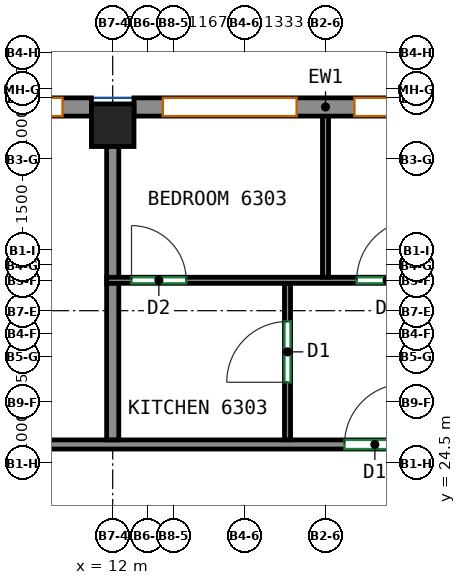
"""IFC4 building model, lengths in metres.
Left out: names, types, materials, properties, quantities, classifications, styles, units other than length and angle.
Written with IfcOpenShell. Run it as: python <this file> out.ifc"""

import sys

from ifc_helpers import new_model, si_unit, direction, frame, frame_2d, origin, origin_2d, place, context, subcontext, project, spatial, rectangle, extrude, source, transform, mapped, element, fill, save


model = new_model("IFC4")
c1 = context("Model", 3, precision=1e-05, world=origin(), true_north=direction((0.0, 1.0)))
c2 = subcontext(c1, "Body", "Model", "MODEL_VIEW")
j1 = project(units=[si_unit("LENGTHUNIT", "METRE"), si_unit("PLANEANGLEUNIT", "RADIAN")], contexts=[c1])
p1 = place(None, origin())
s1 = spatial("IfcSite", under=j1, at=p1, CompositionType="ELEMENT")
p2 = place(p1, origin())
s2 = spatial("IfcBuilding", under=s1, at=p2, CompositionType="ELEMENT")
p3 = place(p2, frame((0.0, 0.0, 259.4)))
s3 = spatial("IfcBuildingStorey", under=s2, at=p3, CompositionType="ELEMENT", Elevation=259.4)
m1 = source(origin(), c2, "Body", "SweptSolid", [
    extrude(rectangle(XDim=0.7, YDim=0.7, at=origin_2d()), origin(), (0.0, 0.0, 1.0), 3.0),
])
p4 = place(p3, frame((12.0, 30.05, 0.0), z_axis=(0.0, 0.0, 1.0), x_axis=(1.0, 0.0, 0.0)))
e1 = element("IfcColumn", 1, at=p4, inside=s3, PredefinedType="COLUMN", context=c2, shape_type="MappedRepresentation", body=[
    mapped(m1, transform((0.0, 0.0, 0.0))),
])
m2 = source(origin(), c2, "Body", "SweptSolid", [
    extrude(rectangle(XDim=6.3, YDim=0.3, at=frame_2d((3.15, 0.0))), origin(), (0.0, 0.0, 1.0), 3.0),
])
p5 = place(p3, frame((18.65, 30.35, 0.0), z_axis=(0.0, 0.0, 1.0), x_axis=(-1.0, 0.0, 0.0)))
e2 = element("IfcWall", 2, at=p5, inside=s3, PredefinedType="SOLIDWALL", context=c2, shape_type="MappedRepresentation", body=[
    mapped(m2, transform((0.0, 0.0, 0.0))),
])
p6 = place(p5, frame((0.475, 0.0, 0.8)))
e3 = element("IfcOpeningElement", 3, at=p6, cuts=e2, PredefinedType="OPENING", context=c2, shape_type="SweptSolid", body=[
    extrude(rectangle(XDim=2.2, YDim=2.05, at=frame_2d((1.1, 1.025))), frame((0.0, 0.16, 0.0), z_axis=(0.0, -1.0, 0.0), x_axis=(1.0, 0.0, 0.0)), (0.0, 0.0, 1.0), 0.32),
])
p7 = place(p5, frame((3.625, 0.0, 0.8)))
e4 = element("IfcOpeningElement", 4, at=p7, cuts=e2, PredefinedType="OPENING", context=c2, shape_type="SweptSolid", body=[
    extrude(rectangle(XDim=2.2, YDim=2.05, at=frame_2d((1.1, 1.025))), frame((0.0, 0.16, 0.0), z_axis=(0.0, -1.0, 0.0), x_axis=(1.0, 0.0, 0.0)), (0.0, 0.0, 1.0), 0.32),
])
p8 = place(p3, frame((11.65, 30.35, 0.0), z_axis=(0.0, 0.0, 1.0), x_axis=(-1.0, 0.0, 0.0)))
e5 = element("IfcWall", 5, at=p8, inside=s3, PredefinedType="SOLIDWALL", context=c2, shape_type="MappedRepresentation", body=[
    mapped(m2, transform((0.0, 0.0, 0.0))),
])
p9 = place(p8, frame((0.475, 0.0, 0.8)))
e6 = element("IfcOpeningElement", 6, at=p9, cuts=e5, PredefinedType="OPENING", context=c2, shape_type="SweptSolid", body=[
    extrude(rectangle(XDim=2.2, YDim=2.05, at=frame_2d((1.1, 1.025))), frame((0.0, 0.16, 0.0), z_axis=(0.0, -1.0, 0.0), x_axis=(1.0, 0.0, 0.0)), (0.0, 0.0, 1.0), 0.32),
])
p10 = place(p8, frame((3.625, 0.0, 0.8)))
e7 = element("IfcOpeningElement", 7, at=p10, cuts=e5, PredefinedType="OPENING", context=c2, shape_type="SweptSolid", body=[
    extrude(rectangle(XDim=2.2, YDim=2.05, at=frame_2d((1.1, 1.025))), frame((0.0, 0.16, 0.0), z_axis=(0.0, -1.0, 0.0), x_axis=(1.0, 0.0, 0.0)), (0.0, 0.0, 1.0), 0.32),
])
p11 = place(p3, frame((-16.075, 24.8, 0.0), z_axis=(0.0, 0.0, 1.0), x_axis=(1.0, 0.0, 0.0)))
e8 = element("IfcWall", 8, at=p11, inside=s3, PredefinedType="PARTITIONING", context=c2, shape_type="SweptSolid", body=[
    extrude(rectangle(XDim=36.073, YDim=0.15, at=frame_2d((18.037, 0.0))), origin(), (0.0, 0.0, 1.0), 3.0),
])
p12 = place(p11, frame((5.919, 0.0, 0.0)))
e9 = element("IfcOpeningElement", 9, at=p12, cuts=e8, PredefinedType="OPENING", context=c2, shape_type="SweptSolid", body=[
    extrude(rectangle(XDim=1.8, YDim=2.1, at=frame_2d((0.9, 1.05))), frame((0.0, 0.085, 0.0), z_axis=(0.0, -1.0, 0.0), x_axis=(1.0, 0.0, 0.0)), (0.0, 0.0, 1.0), 0.17),
])
p13 = place(p11, frame((31.887, 0.0, 0.0)))
e10 = element("IfcOpeningElement", 10, at=p13, cuts=e8, PredefinedType="OPENING", context=c2, shape_type="SweptSolid", body=[
    extrude(rectangle(XDim=1.0, YDim=2.1, at=frame_2d((0.5, 1.05))), frame((0.0, 0.085, 0.0), z_axis=(0.0, -1.0, 0.0), x_axis=(1.0, 0.0, 0.0)), (0.0, 0.0, 1.0), 0.17),
])
p14 = place(p3, frame((12.0, 24.877, 0.0), z_axis=(0.0, 0.0, 1.0), x_axis=(0.0, 1.0, 0.0)))
e11 = element("IfcWall", 11, at=p14, inside=s3, PredefinedType="PARTITIONING", context=c2, shape_type="SweptSolid", body=[
    extrude(rectangle(XDim=2.583, YDim=0.2, at=frame_2d((1.292, 0.0))), origin(), (0.0, 0.0, 1.0), 3.0),
])
p15 = place(p3, frame((12.0, 27.542, 0.0), z_axis=(0.0, 0.0, 1.0), x_axis=(0.0, 1.0, 0.0)))
e12 = element("IfcWall", 12, at=p15, inside=s3, PredefinedType="PARTITIONING", context=c2, shape_type="SweptSolid", body=[
    extrude(rectangle(XDim=2.158, YDim=0.2, at=frame_2d((1.079, 0.0))), origin(), (0.0, 0.0, 1.0), 3.0),
])
p16 = place(p3, frame((14.875, 24.877, 0.0), z_axis=(0.0, 0.0, 1.0), x_axis=(0.0, 1.0, 0.0)))
e13 = element("IfcWall", 13, at=p16, inside=s3, PredefinedType="PARTITIONING", context=c2, shape_type="SweptSolid", body=[
    extrude(rectangle(XDim=2.573, YDim=0.1, at=frame_2d((1.287, 0.0))), origin(), (0.0, 0.0, 1.0), 3.0),
])
p17 = place(p16, frame((0.946, 0.0, 0.0)))
e14 = element("IfcOpeningElement", 14, at=p17, cuts=e13, PredefinedType="OPENING", context=c2, shape_type="SweptSolid", body=[
    extrude(rectangle(XDim=1.0, YDim=2.1, at=frame_2d((0.5, 1.05))), frame((0.0, 0.06, 0.0), z_axis=(0.0, -1.0, 0.0), x_axis=(1.0, 0.0, 0.0)), (0.0, 0.0, 1.0), 0.12),
])
p18 = place(p3, frame((11.9, 27.5, 0.0), z_axis=(0.0, 0.0, 1.0), x_axis=(1.0, 0.0, 0.0)))
e15 = element("IfcWall", 15, at=p18, inside=s3, PredefinedType="PARTITIONING", context=c2, shape_type="SweptSolid", body=[
    extrude(rectangle(XDim=8.775, YDim=0.1, at=frame_2d((4.388, 0.0))), origin(), (0.0, 0.0, 1.0), 3.0),
])
p19 = place(p18, frame((0.409, 0.0, 0.0)))
e16 = element("IfcOpeningElement", 16, at=p19, cuts=e15, PredefinedType="OPENING", context=c2, shape_type="SweptSolid", body=[
    extrude(rectangle(XDim=0.9, YDim=2.1, at=frame_2d((0.45, 1.05))), frame((0.0, 0.06, 0.0), z_axis=(0.0, -1.0, 0.0), x_axis=(1.0, 0.0, 0.0)), (0.0, 0.0, 1.0), 0.12),
])
p20 = place(p18, frame((4.113, 0.0, 0.0)))
e17 = element("IfcOpeningElement", 17, at=p20, cuts=e15, PredefinedType="OPENING", context=c2, shape_type="SweptSolid", body=[
    extrude(rectangle(XDim=1.0, YDim=2.1, at=frame_2d((0.5, 1.05))), frame((0.0, 0.06, 0.0), z_axis=(0.0, -1.0, 0.0), x_axis=(1.0, 0.0, 0.0)), (0.0, 0.0, 1.0), 0.12),
])
p21 = place(p3, frame((15.5, 27.552, 0.0), z_axis=(0.0, 0.0, 1.0), x_axis=(0.0, 1.0, 0.0)))
e18 = element("IfcWall", 18, at=p21, inside=s3, PredefinedType="PARTITIONING", context=c2, shape_type="SweptSolid", body=[
    extrude(rectangle(XDim=2.698, YDim=0.1, at=frame_2d((1.349, 0.0))), origin(), (0.0, 0.0, 1.0), 3.0),
])
p22 = place(p6, origin())
e19 = element("IfcWindow", 19, at=p22, inside=s3, PartitioningType="SINGLE_PANEL", PredefinedType="WINDOW", context=c2, shape_type="SweptSolid", body=[
    extrude(rectangle(XDim=2.2, YDim=2.05, at=frame_2d((1.1, 1.025))), frame((0.0, 0.03, 0.0), z_axis=(0.0, -1.0, 0.0), x_axis=(1.0, 0.0, 0.0)), (0.0, 0.0, 1.0), 0.06),
])
fill(e3, e19)
p23 = place(p7, origin())
e20 = element("IfcWindow", 20, at=p23, inside=s3, PartitioningType="SINGLE_PANEL", PredefinedType="WINDOW", context=c2, shape_type="SweptSolid", body=[
    extrude(rectangle(XDim=2.2, YDim=2.05, at=frame_2d((1.1, 1.025))), frame((0.0, 0.03, 0.0), z_axis=(0.0, -1.0, 0.0), x_axis=(1.0, 0.0, 0.0)), (0.0, 0.0, 1.0), 0.06),
])
fill(e4, e20)
p24 = place(p9, origin())
e21 = element("IfcWindow", 21, at=p24, inside=s3, PartitioningType="SINGLE_PANEL", PredefinedType="WINDOW", context=c2, shape_type="SweptSolid", body=[
    extrude(rectangle(XDim=2.2, YDim=2.05, at=frame_2d((1.1, 1.025))), frame((0.0, 0.03, 0.0), z_axis=(0.0, -1.0, 0.0), x_axis=(1.0, 0.0, 0.0)), (0.0, 0.0, 1.0), 0.06),
])
fill(e6, e21)
p25 = place(p13, origin())
e22 = element("IfcDoor", 22, at=p25, inside=s3, OperationType="SINGLE_SWING_RIGHT", PredefinedType="DOOR", context=c2, shape_type="SweptSolid", body=[
    extrude(rectangle(XDim=1.0, YDim=2.1, at=frame_2d((0.5, 1.05))), frame((0.0, 0.025, 0.0), z_axis=(0.0, -1.0, 0.0), x_axis=(1.0, 0.0, 0.0)), (0.0, 0.0, 1.0), 0.05),
])
fill(e10, e22)
p26 = place(p17, origin())
e23 = element("IfcDoor", 23, at=p26, inside=s3, OperationType="SINGLE_SWING_LEFT", PredefinedType="DOOR", context=c2, shape_type="SweptSolid", body=[
    extrude(rectangle(XDim=1.0, YDim=2.1, at=frame_2d((0.5, 1.05))), frame((0.0, 0.025, 0.0), z_axis=(0.0, -1.0, 0.0), x_axis=(1.0, 0.0, 0.0)), (0.0, 0.0, 1.0), 0.05),
])
fill(e14, e23)
p27 = place(p19, origin())
e24 = element("IfcDoor", 24, at=p27, inside=s3, OperationType="SINGLE_SWING_LEFT", PredefinedType="DOOR", context=c2, shape_type="SweptSolid", body=[
    extrude(rectangle(XDim=0.9, YDim=2.1, at=frame_2d((0.45, 1.05))), frame((0.0, 0.025, 0.0), z_axis=(0.0, -1.0, 0.0), x_axis=(1.0, 0.0, 0.0)), (0.0, 0.0, 1.0), 0.05),
])
fill(e16, e24)
p28 = place(p20, origin())
e25 = element("IfcDoor", 25, at=p28, inside=s3, OperationType="SINGLE_SWING_RIGHT", PredefinedType="DOOR", context=c2, shape_type="SweptSolid", body=[
    extrude(rectangle(XDim=1.0, YDim=2.1, at=frame_2d((0.5, 1.05))), frame((0.0, 0.025, 0.0), z_axis=(0.0, -1.0, 0.0), x_axis=(1.0, 0.0, 0.0)), (0.0, 0.0, 1.0), 0.05),
])
fill(e17, e25)
save(model, sys.argv[1])
